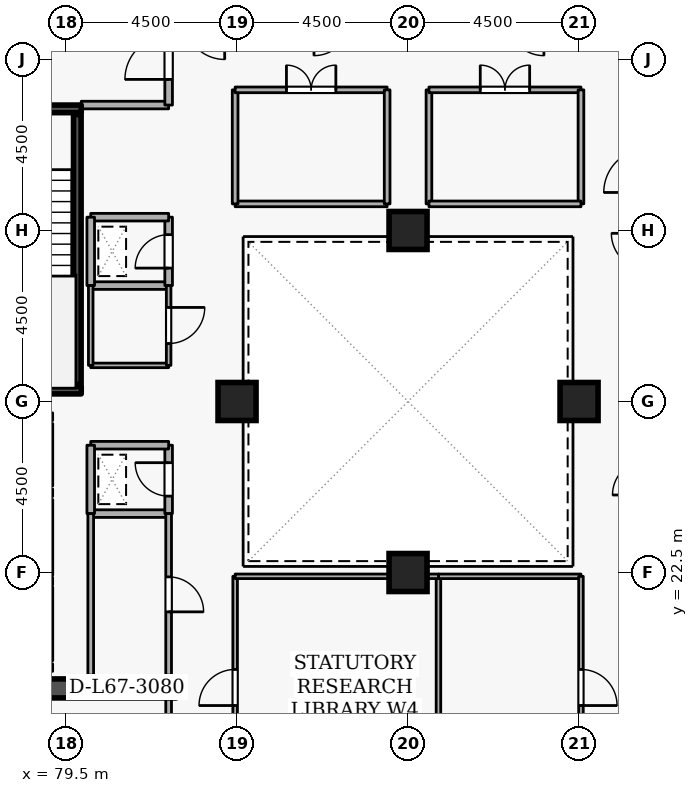
"""IFC4 building model, lengths in metres.
Left out: names, types, materials, properties, quantities, classifications, styles, units other than length and angle.
Written with IfcOpenShell. Run it as: python <this file> out.ifc"""

import sys

from ifc_helpers import new_model, si_unit, direction, frame, frame_2d, origin, origin_2d, place, context, subcontext, project, spatial, rectangle, extrude, element, fill, save


model = new_model("IFC4")
c1 = context("Model", 3, precision=1e-05, world=origin(), true_north=direction((0.0, 1.0)))
c2 = subcontext(c1, "Body", "Model", "MODEL_VIEW")
j1 = project(units=[si_unit("LENGTHUNIT", "METRE"), si_unit("PLANEANGLEUNIT", "RADIAN")], contexts=[c1])
p1 = place(None, origin())
s1 = spatial("IfcSite", under=j1, at=p1, CompositionType="ELEMENT")
p2 = place(p1, origin())
s2 = spatial("IfcBuilding", under=s1, at=p2, CompositionType="ELEMENT")
p3 = place(p2, frame((0.0, 0.0, 251.1)))
s3 = spatial("IfcBuildingStorey", under=s2, at=p3, CompositionType="ELEMENT", Elevation=251.1)
p4 = place(p3, frame((76.6, 19.45, 0.0), z_axis=(0.0, 0.0, 1.0), x_axis=(1.0, 0.0, 0.0)))
e1 = element("IfcWall", 1, at=p4, inside=s3, PredefinedType="SHEAR", context=c2, shape_type="SweptSolid", body=[
    extrude(rectangle(XDim=5.8, YDim=0.5, at=frame_2d((2.9, 0.0))), origin(), (0.0, 0.0, 1.0), 3.6),
])
for number, where, z_axis, x_axis in (
    (2, (93.0, 27.0, 0.0), (0.0, 0.0, 1.0), (1.0, 0.0, 0.0)),
    (3, (84.0, 27.0, 0.0), (0.0, 0.0, 1.0), (1.0, 0.0, 0.0)),
    (4, (88.5, 22.5, 0.0), (0.0, 0.0, 1.0), (1.0, 0.0, 0.0)),
    (5, (88.5, 31.5, 0.0), (0.0, 0.0, 1.0), (1.0, 0.0, 0.0)),
):
    element("IfcColumn", number, at=place(p3, frame(where, z_axis=z_axis, x_axis=x_axis)), inside=s3, PredefinedType="COLUMN", context=c2, shape_type="SweptSolid", body=[
        extrude(rectangle(XDim=1.0, YDim=1.0, at=origin_2d()), origin(), (0.0, 0.0, 1.0), 3.6),
    ])
p5 = place(p3, frame((79.05, 24.78, 0.0), z_axis=(0.0, 0.0, 1.0), x_axis=(0.0, 1.0, 0.0)))
e6 = element("IfcWall", 6, at=p5, inside=s3, PredefinedType="STANDARD", context=c2, shape_type="SweptSolid", body=[
    extrude(rectangle(XDim=1.64, YDim=0.2, at=frame_2d((0.82, 0.0))), origin(), (0.0, 0.0, 1.0), 3.32),
])
p6 = place(p5, frame((0.31, 0.0, 0.0)))
e7 = element("IfcOpeningElement", 7, at=p6, cuts=e6, PredefinedType="OPENING", context=c2, shape_type="SweptSolid", body=[
    extrude(rectangle(XDim=1.02, YDim=2.06, at=frame_2d((0.51, 1.03))), frame((0.0, 0.11, 0.0), z_axis=(0.0, -1.0, 0.0), x_axis=(1.0, 0.0, 0.0)), (0.0, 0.0, 1.0), 0.22),
])
p7 = place(p3, frame((79.05, 22.43, 0.0), z_axis=(0.0, 0.0, 1.0), x_axis=(0.0, 1.0, 0.0)))
e8 = element("IfcWall", 8, at=p7, inside=s3, PredefinedType="STANDARD", context=c2, shape_type="SweptSolid", body=[
    extrude(rectangle(XDim=1.99, YDim=0.2, at=frame_2d((0.995, 0.0))), origin(), (0.0, 0.0, 1.0), 3.32),
])
p8 = place(p7, frame((0.485, 0.0, 0.0)))
e9 = element("IfcOpeningElement", 9, at=p8, cuts=e8, PredefinedType="OPENING", context=c2, shape_type="SweptSolid", body=[
    extrude(rectangle(XDim=1.02, YDim=2.06, at=frame_2d((0.51, 1.03))), frame((0.0, 0.11, 0.0), z_axis=(0.0, -1.0, 0.0), x_axis=(1.0, 0.0, 0.0)), (0.0, 0.0, 1.0), 0.22),
])
p9 = place(p3, frame((79.05, 20.18, 0.0), z_axis=(0.0, 0.0, 1.0), x_axis=(0.0, 1.0, 0.0)))
e10 = element("IfcWall", 10, at=p9, inside=s3, PredefinedType="STANDARD", context=c2, shape_type="SweptSolid", body=[
    extrude(rectangle(XDim=1.94, YDim=0.2, at=frame_2d((0.97, 0.0))), origin(), (0.0, 0.0, 1.0), 3.32),
])
p10 = place(p9, frame((0.46, 0.0, 0.0)))
e11 = element("IfcOpeningElement", 11, at=p10, cuts=e10, PredefinedType="OPENING", context=c2, shape_type="SweptSolid", body=[
    extrude(rectangle(XDim=1.02, YDim=2.06, at=frame_2d((0.51, 1.03))), frame((0.0, 0.11, 0.0), z_axis=(0.0, -1.0, 0.0), x_axis=(1.0, 0.0, 0.0)), (0.0, 0.0, 1.0), 0.22),
])
p11 = place(p3, frame((76.55, 34.7, 0.0), z_axis=(0.0, 0.0, 1.0), x_axis=(1.0, 0.0, 0.0)))
e12 = element("IfcWall", 12, at=p11, inside=s3, PredefinedType="SHEAR", context=c2, shape_type="SweptSolid", body=[
    extrude(rectangle(XDim=3.35, YDim=0.2, at=frame_2d((1.675, 0.0))), origin(), (0.0, 0.0, 1.0), 3.6),
])
p12 = place(p11, frame((1.125, 0.0, 0.0)))
e13 = element("IfcOpeningElement", 13, at=p12, cuts=e12, PredefinedType="OPENING", context=c2, shape_type="SweptSolid", body=[
    extrude(rectangle(XDim=1.1, YDim=2.1, at=frame_2d((0.55, 1.05))), frame((0.0, 0.11, 0.0), z_axis=(0.0, -1.0, 0.0), x_axis=(1.0, 0.0, 0.0)), (0.0, 0.0, 1.0), 0.22),
])
p13 = place(p3, frame((79.9, 27.3, 0.0), z_axis=(0.0, 0.0, 1.0), x_axis=(-1.0, 0.0, 0.0)))
e14 = element("IfcWall", 14, at=p13, inside=s3, PredefinedType="SHEAR", context=c2, shape_type="SweptSolid", body=[
    extrude(rectangle(XDim=3.35, YDim=0.2, at=frame_2d((1.675, 0.0))), origin(), (0.0, 0.0, 1.0), 3.6),
])
p14 = place(p3, frame((79.797, 27.45, 0.0), z_axis=(0.0, 0.0, 1.0), x_axis=(0.0, 1.0, 0.0)))
e15 = element("IfcWall", 15, at=p14, inside=s3, PredefinedType="SHEAR", context=c2, shape_type="SweptSolid", body=[
    extrude(rectangle(XDim=7.1, YDim=0.2, at=frame_2d((3.55, 0.0))), origin(), (0.0, 0.0, 1.0), 3.6),
])
p15 = place(p3, frame((79.9, 34.8, 0.0), z_axis=(0.0, 0.0, 1.0), x_axis=(1.0, 0.0, 0.0)))
e16 = element("IfcWall", 16, at=p15, inside=s3, PredefinedType="STANDARD", context=c2, shape_type="SweptSolid", body=[
    extrude(rectangle(XDim=2.3, YDim=0.2, at=frame_2d((1.15, 0.0))), origin(), (0.0, 0.0, 1.0), 2.525),
])
p16 = place(p3, frame((82.2, 34.8, 0.0), z_axis=(0.0, 0.0, 1.0), x_axis=(0.0, 1.0, 0.0)))
e17 = element("IfcWall", 17, at=p16, inside=s3, PredefinedType="STANDARD", context=c2, shape_type="SweptSolid", body=[
    extrude(rectangle(XDim=2.5, YDim=0.2, at=frame_2d((1.25, 0.0))), origin(), (0.0, 0.0, 1.0), 3.32),
])
p17 = place(p16, frame((0.675, 0.0, 0.0)))
e18 = element("IfcOpeningElement", 18, at=p17, cuts=e17, PredefinedType="OPENING", context=c2, shape_type="SweptSolid", body=[
    extrude(rectangle(XDim=1.15, YDim=2.1, at=frame_2d((0.575, 1.05))), frame((0.0, 0.11, 0.0), z_axis=(0.0, -1.0, 0.0), x_axis=(1.0, 0.0, 0.0)), (0.0, 0.0, 1.0), 0.22),
])
p18 = place(p3, frame((80.15, 24.05, 0.0), z_axis=(0.0, 0.0, 1.0), x_axis=(1.0, 0.0, 0.0)))
e19 = element("IfcWall", 19, at=p18, inside=s3, PredefinedType="STANDARD", context=c2, shape_type="SweptSolid", body=[
    extrude(rectangle(XDim=2.05, YDim=0.2, at=frame_2d((1.025, 0.0))), origin(), (0.0, 0.0, 1.0), 3.32),
])
p19 = place(p3, frame((82.2, 24.05, 0.0), z_axis=(0.0, 0.0, 1.0), x_axis=(0.0, 1.0, 0.0)))
e20 = element("IfcWall", 20, at=p19, inside=s3, PredefinedType="STANDARD", context=c2, shape_type="SweptSolid", body=[
    extrude(rectangle(XDim=1.8, YDim=0.2, at=frame_2d((0.9, 0.0))), origin(), (0.0, 0.0, 1.0), 3.32),
])
p20 = place(p19, frame((0.46, 0.0, 0.0)))
e21 = element("IfcOpeningElement", 21, at=p20, cuts=e20, PredefinedType="OPENING", context=c2, shape_type="SweptSolid", body=[
    extrude(rectangle(XDim=0.88, YDim=2.04, at=frame_2d((0.44, 1.02))), frame((0.0, 0.11, 0.0), z_axis=(0.0, -1.0, 0.0), x_axis=(1.0, 0.0, 0.0)), (0.0, 0.0, 1.0), 0.22),
])
p21 = place(p3, frame((82.2, 25.85, 0.0), z_axis=(0.0, 0.0, 1.0), x_axis=(-1.0, 0.0, 0.0)))
e22 = element("IfcWall", 22, at=p21, inside=s3, PredefinedType="STANDARD", context=c2, shape_type="SweptSolid", body=[
    extrude(rectangle(XDim=2.05, YDim=0.2, at=frame_2d((1.025, 0.0))), origin(), (0.0, 0.0, 1.0), 3.32),
])
p22 = place(p3, frame((80.15, 25.85, 0.0), z_axis=(0.0, 0.0, 1.0), x_axis=(0.0, -1.0, 0.0)))
e23 = element("IfcWall", 23, at=p22, inside=s3, PredefinedType="STANDARD", context=c2, shape_type="SweptSolid", body=[
    extrude(rectangle(XDim=1.8, YDim=0.2, at=frame_2d((0.9, 0.0))), origin(), (0.0, 0.0, 1.0), 3.32),
])
p23 = place(p3, frame((80.15, 30.05, 0.0), z_axis=(0.0, 0.0, 1.0), x_axis=(1.0, 0.0, 0.0)))
e24 = element("IfcWall", 24, at=p23, inside=s3, PredefinedType="STANDARD", context=c2, shape_type="SweptSolid", body=[
    extrude(rectangle(XDim=2.05, YDim=0.2, at=frame_2d((1.025, 0.0))), origin(), (0.0, 0.0, 1.0), 3.32),
])
p24 = place(p3, frame((82.2, 30.05, 0.0), z_axis=(0.0, 0.0, 1.0), x_axis=(0.0, 1.0, 0.0)))
e25 = element("IfcWall", 25, at=p24, inside=s3, PredefinedType="STANDARD", context=c2, shape_type="SweptSolid", body=[
    extrude(rectangle(XDim=1.8, YDim=0.2, at=frame_2d((0.9, 0.0))), origin(), (0.0, 0.0, 1.0), 3.32),
])
p25 = place(p24, frame((0.46, 0.0, 0.0)))
e26 = element("IfcOpeningElement", 26, at=p25, cuts=e25, PredefinedType="OPENING", context=c2, shape_type="SweptSolid", body=[
    extrude(rectangle(XDim=0.88, YDim=2.04, at=frame_2d((0.44, 1.02))), frame((0.0, 0.11, 0.0), z_axis=(0.0, -1.0, 0.0), x_axis=(1.0, 0.0, 0.0)), (0.0, 0.0, 1.0), 0.22),
])
p26 = place(p3, frame((82.2, 31.85, 0.0), z_axis=(0.0, 0.0, 1.0), x_axis=(-1.0, 0.0, 0.0)))
e27 = element("IfcWall", 27, at=p26, inside=s3, PredefinedType="STANDARD", context=c2, shape_type="SweptSolid", body=[
    extrude(rectangle(XDim=2.05, YDim=0.2, at=frame_2d((1.025, 0.0))), origin(), (0.0, 0.0, 1.0), 3.32),
])
p27 = place(p3, frame((80.15, 31.85, 0.0), z_axis=(0.0, 0.0, 1.0), x_axis=(0.0, -1.0, 0.0)))
e28 = element("IfcWall", 28, at=p27, inside=s3, PredefinedType="STANDARD", context=c2, shape_type="SweptSolid", body=[
    extrude(rectangle(XDim=1.8, YDim=0.2, at=frame_2d((0.9, 0.0))), origin(), (0.0, 0.0, 1.0), 3.32),
])
p28 = place(p3, frame((80.15, 19.8, 0.0), z_axis=(0.0, 0.0, 1.0), x_axis=(0.0, 1.0, 0.0)))
e29 = element("IfcWall", 29, at=p28, inside=s3, PredefinedType="PARTITIONING", context=c2, shape_type="SweptSolid", body=[
    extrude(rectangle(XDim=4.25, YDim=0.15, at=frame_2d((2.125, 0.0))), origin(), (0.0, 0.0, 1.0), 3.32),
])
p29 = place(p3, frame((82.2, 24.05, 0.0), z_axis=(0.0, 0.0, 1.0), x_axis=(0.0, -1.0, 0.0)))
e30 = element("IfcWall", 30, at=p29, inside=s3, PredefinedType="PARTITIONING", context=c2, shape_type="SweptSolid", body=[
    extrude(rectangle(XDim=4.25, YDim=0.15, at=frame_2d((2.125, 0.0))), origin(), (0.0, 0.0, 1.0), 3.32),
])
p30 = place(p29, frame((1.665, 0.0, 0.0)))
e31 = element("IfcOpeningElement", 31, at=p30, cuts=e30, PredefinedType="OPENING", context=c2, shape_type="SweptSolid", body=[
    extrude(rectangle(XDim=0.92, YDim=2.08, at=frame_2d((0.46, 1.04))), frame((0.0, 0.085, 0.0), z_axis=(0.0, -1.0, 0.0), x_axis=(1.0, 0.0, 0.0)), (0.0, 0.0, 1.0), 0.17),
])
p31 = place(p3, frame((82.2, 27.95, 0.0), z_axis=(0.0, 0.0, 1.0), x_axis=(-1.0, 0.0, 0.0)))
e32 = element("IfcWall", 32, at=p31, inside=s3, PredefinedType="PARTITIONING", context=c2, shape_type="SweptSolid", body=[
    extrude(rectangle(XDim=2.05, YDim=0.12, at=frame_2d((1.025, 0.0))), origin(), (0.0, 0.0, 1.0), 3.32),
])
p32 = place(p3, frame((80.15, 27.95, 0.0), z_axis=(0.0, 0.0, 1.0), x_axis=(0.0, 1.0, 0.0)))
e33 = element("IfcWall", 33, at=p32, inside=s3, PredefinedType="PARTITIONING", context=c2, shape_type="SweptSolid", body=[
    extrude(rectangle(XDim=2.1, YDim=0.12, at=frame_2d((1.05, 0.0))), origin(), (0.0, 0.0, 1.0), 3.32),
])
p33 = place(p3, frame((82.2, 30.05, 0.0), z_axis=(0.0, 0.0, 1.0), x_axis=(0.0, -1.0, 0.0)))
e34 = element("IfcWall", 34, at=p33, inside=s3, PredefinedType="PARTITIONING", context=c2, shape_type="SweptSolid", body=[
    extrude(rectangle(XDim=2.1, YDim=0.12, at=frame_2d((1.05, 0.0))), origin(), (0.0, 0.0, 1.0), 3.32),
])
p34 = place(p33, frame((0.575, 0.0, 0.0)))
e35 = element("IfcOpeningElement", 35, at=p34, cuts=e34, PredefinedType="OPENING", context=c2, shape_type="SweptSolid", body=[
    extrude(rectangle(XDim=0.95, YDim=2.1, at=frame_2d((0.475, 1.05))), frame((0.0, 0.07, 0.0), z_axis=(0.0, -1.0, 0.0), x_axis=(1.0, 0.0, 0.0)), (0.0, 0.0, 1.0), 0.14),
])
p35 = place(p3, frame((82.2, 19.2, 0.0), z_axis=(0.0, 0.0, 1.0), x_axis=(0.0, -1.0, 0.0)))
e36 = element("IfcWall", 36, at=p35, inside=s3, PredefinedType="PARTITIONING", context=c2, shape_type="SweptSolid", body=[
    extrude(rectangle(XDim=2.0, YDim=0.15, at=frame_2d((1.0, 0.0))), origin(), (0.0, 0.0, 1.0), 3.32),
])
p36 = place(p35, frame((0.525, 0.0, 0.0)))
e37 = element("IfcOpeningElement", 37, at=p36, cuts=e36, PredefinedType="OPENING", context=c2, shape_type="SweptSolid", body=[
    extrude(rectangle(XDim=0.95, YDim=2.1, at=frame_2d((0.475, 1.05))), frame((0.0, 0.085, 0.0), z_axis=(0.0, -1.0, 0.0), x_axis=(1.0, 0.0, 0.0)), (0.0, 0.0, 1.0), 0.17),
])
p37 = place(p3, frame((89.3, 16.55, 0.0), z_axis=(0.0, 0.0, 1.0), x_axis=(0.0, 1.0, 0.0)))
e38 = element("IfcWall", 38, at=p37, inside=s3, PredefinedType="PARTITIONING", context=c2, shape_type="SweptSolid", body=[
    extrude(rectangle(XDim=5.85, YDim=0.12, at=frame_2d((2.925, 0.0))), origin(), (0.0, 0.0, 1.0), 3.32),
])
p38 = place(p3, frame((89.3, 22.4, 0.0), z_axis=(0.0, 0.0, 1.0), x_axis=(1.0, 0.0, 0.0)))
e39 = element("IfcWall", 39, at=p38, inside=s3, PredefinedType="PARTITIONING", context=c2, shape_type="SweptSolid", body=[
    extrude(rectangle(XDim=3.75, YDim=0.12, at=frame_2d((1.875, 0.0))), origin(), (0.0, 0.0, 1.0), 3.32),
])
p39 = place(p3, frame((93.05, 22.4, 0.0), z_axis=(0.0, 0.0, 1.0), x_axis=(0.0, -1.0, 0.0)))
e40 = element("IfcWall", 40, at=p39, inside=s3, PredefinedType="PARTITIONING", context=c2, shape_type="SweptSolid", body=[
    extrude(rectangle(XDim=5.85, YDim=0.12, at=frame_2d((2.925, 0.0))), origin(), (0.0, 0.0, 1.0), 3.32),
])
p40 = place(p39, frame((2.45, 0.0, 0.0)))
e41 = element("IfcOpeningElement", 41, at=p40, cuts=e40, PredefinedType="OPENING", context=c2, shape_type="SweptSolid", body=[
    extrude(rectangle(XDim=0.95, YDim=2.1, at=frame_2d((0.475, 1.05))), frame((0.0, 0.07, 0.0), z_axis=(0.0, -1.0, 0.0), x_axis=(1.0, 0.0, 0.0)), (0.0, 0.0, 1.0), 0.14),
])
p41 = place(p3, frame((83.95, 16.55, 0.0), z_axis=(0.0, 0.0, 1.0), x_axis=(0.0, 1.0, 0.0)))
e42 = element("IfcWall", 42, at=p41, inside=s3, PredefinedType="PARTITIONING", context=c2, shape_type="SweptSolid", body=[
    extrude(rectangle(XDim=5.85, YDim=0.12, at=frame_2d((2.925, 0.0))), origin(), (0.0, 0.0, 1.0), 3.32),
])
p42 = place(p41, frame((2.45, 0.0, 0.0)))
e43 = element("IfcOpeningElement", 43, at=p42, cuts=e42, PredefinedType="OPENING", context=c2, shape_type="SweptSolid", body=[
    extrude(rectangle(XDim=0.95, YDim=2.1, at=frame_2d((0.475, 1.05))), frame((0.0, 0.07, 0.0), z_axis=(0.0, -1.0, 0.0), x_axis=(1.0, 0.0, 0.0)), (0.0, 0.0, 1.0), 0.14),
])
p43 = place(p3, frame((83.95, 22.4, 0.0), z_axis=(0.0, 0.0, 1.0), x_axis=(1.0, 0.0, 0.0)))
e44 = element("IfcWall", 44, at=p43, inside=s3, PredefinedType="PARTITIONING", context=c2, shape_type="SweptSolid", body=[
    extrude(rectangle(XDim=5.35, YDim=0.12, at=frame_2d((2.675, 0.0))), origin(), (0.0, 0.0, 1.0), 3.32),
])
p44 = place(p3, frame((89.05, 32.2, 0.0), z_axis=(0.0, 0.0, 1.0), x_axis=(0.0, 1.0, 0.0)))
e45 = element("IfcWall", 45, at=p44, inside=s3, PredefinedType="PARTITIONING", context=c2, shape_type="SweptSolid", body=[
    extrude(rectangle(XDim=3.0, YDim=0.15, at=frame_2d((1.5, 0.0))), origin(), (0.0, 0.0, 1.0), 1.785),
])
p45 = place(p3, frame((89.05, 35.2, 0.0), z_axis=(0.0, 0.0, 1.0), x_axis=(1.0, 0.0, 0.0)))
e46 = element("IfcWall", 46, at=p45, inside=s3, PredefinedType="PARTITIONING", context=c2, shape_type="SweptSolid", body=[
    extrude(rectangle(XDim=4.0, YDim=0.15, at=frame_2d((2.0, 0.0))), origin(), (0.0, 0.0, 1.0), 3.32),
])
p46 = place(p45, frame((1.35, 0.0, 0.0)))
e47 = element("IfcOpeningElement", 47, at=p46, cuts=e46, PredefinedType="OPENING", context=c2, shape_type="SweptSolid", body=[
    extrude(rectangle(XDim=1.3, YDim=2.12, at=frame_2d((0.65, 1.06))), frame((0.0, 0.085, 0.0), z_axis=(0.0, -1.0, 0.0), x_axis=(1.0, 0.0, 0.0)), (0.0, 0.0, 1.0), 0.17),
])
p47 = place(p3, frame((93.05, 35.2, 0.0), z_axis=(0.0, 0.0, 1.0), x_axis=(0.0, -1.0, 0.0)))
e48 = element("IfcWall", 48, at=p47, inside=s3, PredefinedType="PARTITIONING", context=c2, shape_type="SweptSolid", body=[
    extrude(rectangle(XDim=3.0, YDim=0.15, at=frame_2d((1.5, 0.0))), origin(), (0.0, 0.0, 1.0), 3.32),
])
for number, where, z_axis, x_axis in (
    (49, (93.05, 32.2, 0.0), (0.0, 0.0, 1.0), (-1.0, 0.0, 0.0)),
    (50, (87.95, 32.2, 0.0), (0.0, 0.0, 1.0), (-1.0, 0.0, 0.0)),
):
    element("IfcWall", number, at=place(p3, frame(where, z_axis=z_axis, x_axis=x_axis)), inside=s3, PredefinedType="PARTITIONING", context=c2, shape_type="SweptSolid", body=[
        extrude(rectangle(XDim=4.0, YDim=0.15, at=frame_2d((2.0, 0.0))), origin(), (0.0, 0.0, 1.0), 3.32),
    ])
p48 = place(p3, frame((83.95, 32.2, 0.0), z_axis=(0.0, 0.0, 1.0), x_axis=(0.0, 1.0, 0.0)))
e51 = element("IfcWall", 51, at=p48, inside=s3, PredefinedType="PARTITIONING", context=c2, shape_type="SweptSolid", body=[
    extrude(rectangle(XDim=3.0, YDim=0.15, at=frame_2d((1.5, 0.0))), origin(), (0.0, 0.0, 1.0), 3.32),
])
p49 = place(p3, frame((83.95, 35.2, 0.0), z_axis=(0.0, 0.0, 1.0), x_axis=(1.0, 0.0, 0.0)))
e52 = element("IfcWall", 52, at=p49, inside=s3, PredefinedType="PARTITIONING", context=c2, shape_type="SweptSolid", body=[
    extrude(rectangle(XDim=4.0, YDim=0.15, at=frame_2d((2.0, 0.0))), origin(), (0.0, 0.0, 1.0), 3.32),
])
p50 = place(p49, frame((1.35, 0.0, 0.0)))
e53 = element("IfcOpeningElement", 53, at=p50, cuts=e52, PredefinedType="OPENING", context=c2, shape_type="SweptSolid", body=[
    extrude(rectangle(XDim=1.3, YDim=2.12, at=frame_2d((0.65, 1.06))), frame((0.0, 0.085, 0.0), z_axis=(0.0, -1.0, 0.0), x_axis=(1.0, 0.0, 0.0)), (0.0, 0.0, 1.0), 0.17),
])
p51 = place(p3, frame((87.95, 35.2, 0.0), z_axis=(0.0, 0.0, 1.0), x_axis=(0.0, -1.0, 0.0)))
e54 = element("IfcWall", 54, at=p51, inside=s3, PredefinedType="PARTITIONING", context=c2, shape_type="SweptSolid", body=[
    extrude(rectangle(XDim=3.0, YDim=0.15, at=frame_2d((1.5, 0.0))), origin(), (0.0, 0.0, 1.0), 1.785),
])
p52 = place(p17, origin())
e55 = element("IfcDoor", 55, at=p52, inside=s3, OperationType="SINGLE_SWING_LEFT", PredefinedType="DOOR", context=c2, shape_type="SweptSolid", body=[
    extrude(rectangle(XDim=1.15, YDim=2.1, at=frame_2d((0.575, 1.05))), frame((0.0, 0.025, 0.0), z_axis=(0.0, -1.0, 0.0), x_axis=(1.0, 0.0, 0.0)), (0.0, 0.0, 1.0), 0.05),
])
fill(e18, e55)
p53 = place(p20, origin())
e56 = element("IfcDoor", 56, at=p53, inside=s3, OperationType="SINGLE_SWING_RIGHT", PredefinedType="DOOR", context=c2, shape_type="SweptSolid", body=[
    extrude(rectangle(XDim=0.88, YDim=2.04, at=frame_2d((0.44, 1.02))), frame((0.0, 0.025, 0.0), z_axis=(0.0, -1.0, 0.0), x_axis=(1.0, 0.0, 0.0)), (0.0, 0.0, 1.0), 0.05),
])
fill(e21, e56)
p54 = place(p25, origin())
e57 = element("IfcDoor", 57, at=p54, inside=s3, OperationType="SINGLE_SWING_LEFT", PredefinedType="DOOR", context=c2, shape_type="SweptSolid", body=[
    extrude(rectangle(XDim=0.88, YDim=2.04, at=frame_2d((0.44, 1.02))), frame((0.0, 0.025, 0.0), z_axis=(0.0, -1.0, 0.0), x_axis=(1.0, 0.0, 0.0)), (0.0, 0.0, 1.0), 0.05),
])
fill(e26, e57)
p55 = place(p30, origin())
e58 = element("IfcDoor", 58, at=p55, inside=s3, OperationType="SINGLE_SWING_RIGHT", PredefinedType="DOOR", context=c2, shape_type="SweptSolid", body=[
    extrude(rectangle(XDim=0.92, YDim=2.08, at=frame_2d((0.46, 1.04))), frame((0.0, 0.025, 0.0), z_axis=(0.0, -1.0, 0.0), x_axis=(1.0, 0.0, 0.0)), (0.0, 0.0, 1.0), 0.05),
])
fill(e31, e58)
p56 = place(p34, origin())
e59 = element("IfcDoor", 59, at=p56, inside=s3, OperationType="SINGLE_SWING_LEFT", PredefinedType="DOOR", context=c2, shape_type="SweptSolid", body=[
    extrude(rectangle(XDim=0.95, YDim=2.1, at=frame_2d((0.475, 1.05))), frame((0.0, 0.025, 0.0), z_axis=(0.0, -1.0, 0.0), x_axis=(1.0, 0.0, 0.0)), (0.0, 0.0, 1.0), 0.05),
])
fill(e35, e59)
p57 = place(p40, origin())
e60 = element("IfcDoor", 60, at=p57, inside=s3, OperationType="SINGLE_SWING_RIGHT", PredefinedType="DOOR", context=c2, shape_type="SweptSolid", body=[
    extrude(rectangle(XDim=0.95, YDim=2.1, at=frame_2d((0.475, 1.05))), frame((0.0, 0.025, 0.0), z_axis=(0.0, -1.0, 0.0), x_axis=(1.0, 0.0, 0.0)), (0.0, 0.0, 1.0), 0.05),
])
fill(e41, e60)
p58 = place(p42, origin())
e61 = element("IfcDoor", 61, at=p58, inside=s3, OperationType="SINGLE_SWING_LEFT", PredefinedType="DOOR", context=c2, shape_type="SweptSolid", body=[
    extrude(rectangle(XDim=0.95, YDim=2.1, at=frame_2d((0.475, 1.05))), frame((0.0, 0.025, 0.0), z_axis=(0.0, -1.0, 0.0), x_axis=(1.0, 0.0, 0.0)), (0.0, 0.0, 1.0), 0.05),
])
fill(e43, e61)
p59 = place(p46, origin())
e62 = element("IfcDoor", 62, at=p59, inside=s3, OperationType="DOUBLE_DOOR_SINGLE_SWING", PredefinedType="DOOR", context=c2, shape_type="SweptSolid", body=[
    extrude(rectangle(XDim=1.3, YDim=2.12, at=frame_2d((0.65, 1.06))), frame((0.0, 0.025, 0.0), z_axis=(0.0, -1.0, 0.0), x_axis=(1.0, 0.0, 0.0)), (0.0, 0.0, 1.0), 0.05),
])
fill(e47, e62)
p60 = place(p50, origin())
e63 = element("IfcDoor", 63, at=p60, inside=s3, OperationType="DOUBLE_DOOR_SINGLE_SWING", PredefinedType="DOOR", context=c2, shape_type="SweptSolid", body=[
    extrude(rectangle(XDim=1.3, YDim=2.12, at=frame_2d((0.65, 1.06))), frame((0.0, 0.025, 0.0), z_axis=(0.0, -1.0, 0.0), x_axis=(1.0, 0.0, 0.0)), (0.0, 0.0, 1.0), 0.05),
])
fill(e53, e63)
save(model, sys.argv[1])
